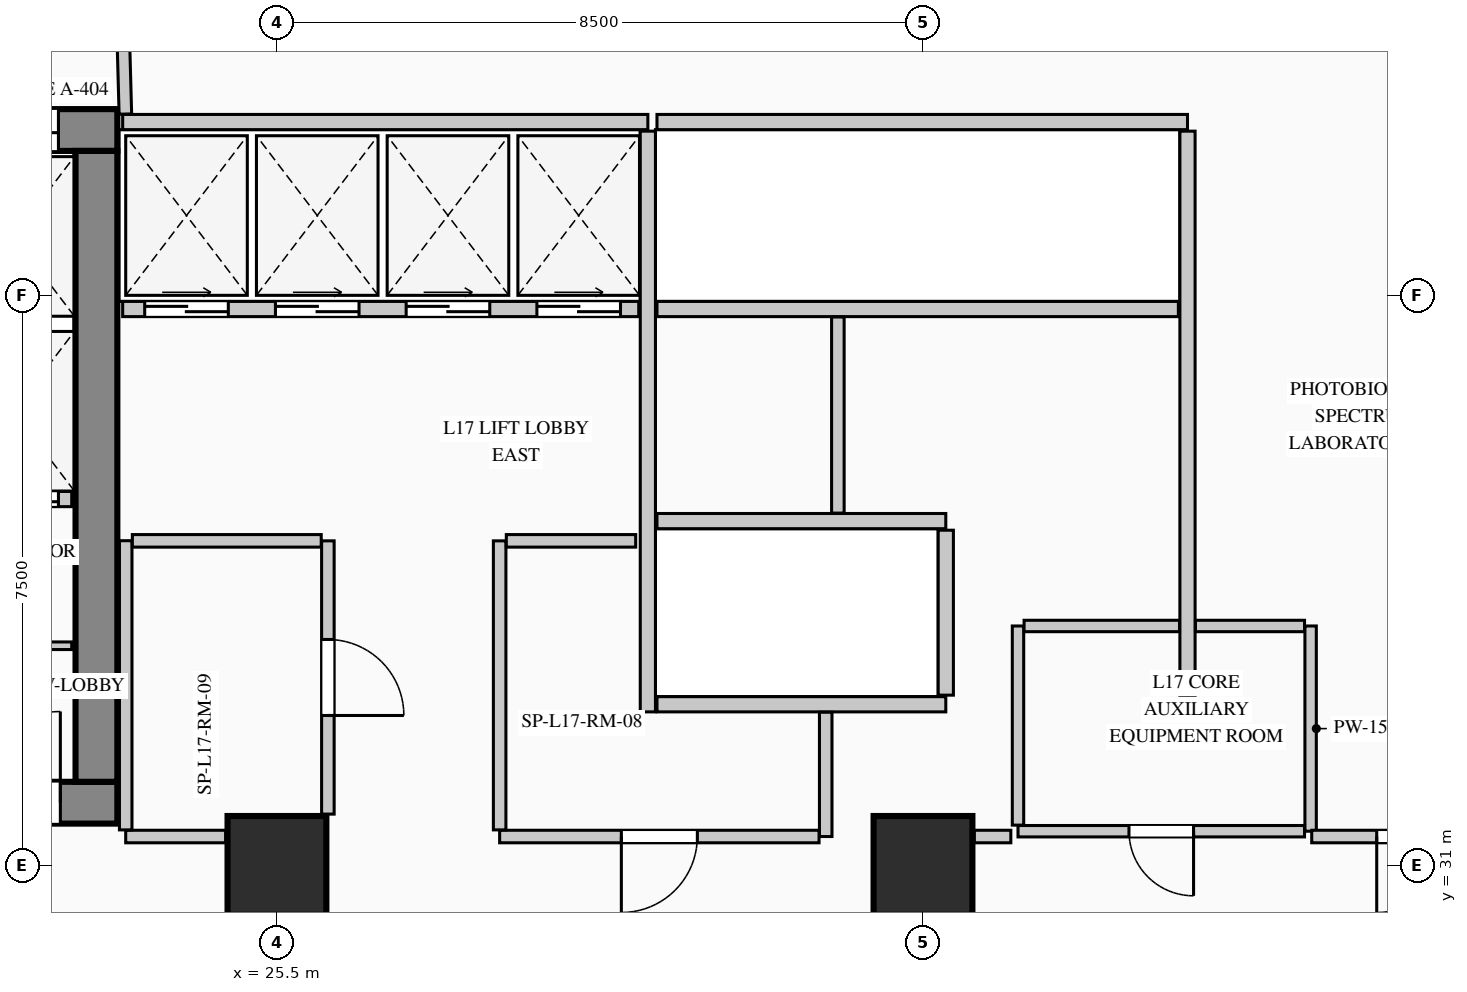
"""IFC4 building model, lengths in metres.
Left out: names, types, materials, properties, quantities, classifications, styles, units other than length and angle.
Written with IfcOpenShell. Run it as: python <this file> out.ifc"""

import sys

from ifc_helpers import new_model, si_unit, direction, frame, frame_2d, origin, origin_2d, place, context, subcontext, project, spatial, rectangle, extrude, element, fill, save


model = new_model("IFC4")
c1 = context("Model", 3, precision=1e-05, world=origin(), true_north=direction((0.0, 1.0)))
c2 = subcontext(c1, "Body", "Model", "MODEL_VIEW")
j1 = project(units=[si_unit("LENGTHUNIT", "METRE"), si_unit("PLANEANGLEUNIT", "RADIAN")], contexts=[c1])
p1 = place(None, origin())
s1 = spatial("IfcSite", under=j1, at=p1, CompositionType="ELEMENT")
p2 = place(p1, origin())
s2 = spatial("IfcBuilding", under=s1, at=p2, CompositionType="ELEMENT")
p3 = place(p2, frame((0.0, 0.0, 75.4)))
s3 = spatial("IfcBuildingStorey", under=s2, at=p3, CompositionType="ELEMENT", Elevation=75.4)
p4 = place(p3, frame((5.45, 40.675, 0.0), z_axis=(0.0, 0.0, 1.0), x_axis=(1.0, 0.0, 0.0)))
e1 = element("IfcWall", 1, at=p4, inside=s3, PredefinedType="SHEAR", context=c2, shape_type="SweptSolid", body=[
    extrude(rectangle(XDim=17.95, YDim=0.55, at=frame_2d((8.975, 0.0))), origin(), (0.0, 0.0, 1.0), 4.4),
])
p5 = place(p4, frame((15.995, 0.0, 0.0)))
e2 = element("IfcOpeningElement", 2, at=p5, cuts=e1, PredefinedType="OPENING", context=c2, shape_type="SweptSolid", body=[
    extrude(rectangle(XDim=1.18, YDim=2.25, at=frame_2d((0.59, 1.125))), frame((0.0, 0.285, 0.0), z_axis=(0.0, -1.0, 0.0), x_axis=(1.0, 0.0, 0.0)), (0.0, 0.0, 1.0), 0.57),
])
p6 = place(p3, frame((5.45, 31.825, 0.0), z_axis=(0.0, 0.0, 1.0), x_axis=(1.0, 0.0, 0.0)))
e3 = element("IfcWall", 3, at=p6, inside=s3, PredefinedType="SHEAR", context=c2, shape_type="SweptSolid", body=[
    extrude(rectangle(XDim=17.95, YDim=0.55, at=frame_2d((8.975, 0.0))), origin(), (0.0, 0.0, 1.0), 4.4),
])
p7 = place(p6, frame((3.2, 0.0, 0.0)))
e4 = element("IfcOpeningElement", 4, at=p7, cuts=e3, PredefinedType="OPENING", context=c2, shape_type="SweptSolid", body=[
    extrude(rectangle(XDim=1.2, YDim=2.2, at=frame_2d((0.6, 1.1))), frame((0.0, 0.285, 0.0), z_axis=(0.0, -1.0, 0.0), x_axis=(1.0, 0.0, 0.0)), (0.0, 0.0, 1.0), 0.57),
])
p8 = place(p6, frame((7.05, 0.0, 0.0)))
e5 = element("IfcOpeningElement", 5, at=p8, cuts=e3, PredefinedType="OPENING", context=c2, shape_type="SweptSolid", body=[
    extrude(rectangle(XDim=1.2, YDim=2.2, at=frame_2d((0.6, 1.1))), frame((0.0, 0.285, 0.0), z_axis=(0.0, -1.0, 0.0), x_axis=(1.0, 0.0, 0.0)), (0.0, 0.0, 1.0), 0.57),
])
p9 = place(p6, frame((8.9, 0.0, 0.0)))
e6 = element("IfcOpeningElement", 6, at=p9, cuts=e3, PredefinedType="OPENING", context=c2, shape_type="SweptSolid", body=[
    extrude(rectangle(XDim=1.15, YDim=2.2, at=frame_2d((0.575, 1.1))), frame((0.0, 0.285, 0.0), z_axis=(0.0, -1.0, 0.0), x_axis=(1.0, 0.0, 0.0)), (0.0, 0.0, 1.0), 0.57),
])
p10 = place(p6, frame((16.0, 0.0, 0.0)))
e7 = element("IfcOpeningElement", 7, at=p10, cuts=e3, PredefinedType="OPENING", context=c2, shape_type="SweptSolid", body=[
    extrude(rectangle(XDim=1.2, YDim=2.2, at=frame_2d((0.6, 1.1))), frame((0.0, 0.285, 0.0), z_axis=(0.0, -1.0, 0.0), x_axis=(1.0, 0.0, 0.0)), (0.0, 0.0, 1.0), 0.57),
])
p11 = place(p3, frame((23.125, 32.1, 0.0), z_axis=(0.0, 0.0, 1.0), x_axis=(0.0, 1.0, 0.0)))
e8 = element("IfcWall", 8, at=p11, inside=s3, PredefinedType="SHEAR", context=c2, shape_type="SweptSolid", body=[
    extrude(rectangle(XDim=8.3, YDim=0.55, at=frame_2d((4.15, 0.0))), origin(), (0.0, 0.0, 1.0), 4.4),
])
for number, where, z_axis, x_axis in (
    (9, (25.5, 31.0, 0.0), (0.0, 0.0, 1.0), (1.0, 0.0, 0.0)),
    (10, (34.0, 31.0, 0.0), (0.0, 0.0, 1.0), (1.0, 0.0, 0.0)),
):
    element("IfcColumn", number, at=place(p3, frame(where, z_axis=z_axis, x_axis=x_axis)), inside=s3, PredefinedType="COLUMN", context=c2, shape_type="SweptSolid", body=[
        extrude(rectangle(XDim=1.3, YDim=1.3, at=origin_2d()), origin(), (0.0, 0.0, 1.0), 4.4),
    ])
p12 = place(p3, frame((21.38, 33.89, 0.0), z_axis=(0.0, 0.0, 1.0), x_axis=(1.0, 0.0, 0.0)))
e11 = element("IfcWall", 11, at=p12, inside=s3, PredefinedType="PARTITIONING", context=c2, shape_type="SweptSolid", body=[
    extrude(rectangle(XDim=1.42, YDim=0.1, at=frame_2d((0.71, 0.0))), origin(), (0.0, 0.0, 1.0), 4.115),
])
p13 = place(p12, frame((0.28, 0.0, 0.0)))
e12 = element("IfcOpeningElement", 12, at=p13, cuts=e11, PredefinedType="OPENING", context=c2, shape_type="SweptSolid", body=[
    extrude(rectangle(XDim=0.85, YDim=2.1, at=frame_2d((0.425, 1.05))), frame((0.0, 0.06, 0.0), z_axis=(0.0, -1.0, 0.0), x_axis=(1.0, 0.0, 0.0)), (0.0, 0.0, 1.0), 0.12),
])
p14 = place(p3, frame((21.3, 35.82, 0.0), z_axis=(0.0, 0.0, 1.0), x_axis=(1.0, 0.0, 0.0)))
e13 = element("IfcWall", 13, at=p14, inside=s3, PredefinedType="PARTITIONING", context=c2, shape_type="SweptSolid", body=[
    extrude(rectangle(XDim=1.5, YDim=0.2, at=frame_2d((0.75, 0.0))), origin(), (0.0, 0.0, 1.0), 4.115),
])
p15 = place(p14, frame((0.145, 0.0, 0.0)))
e14 = element("IfcOpeningElement", 14, at=p15, cuts=e13, PredefinedType="OPENING", context=c2, shape_type="SweptSolid", body=[
    extrude(rectangle(XDim=1.18, YDim=2.25, at=frame_2d((0.59, 1.125))), frame((0.0, 0.11, 0.0), z_axis=(0.0, -1.0, 0.0), x_axis=(1.0, 0.0, 0.0)), (0.0, 0.0, 1.0), 0.22),
])
p16 = place(p3, frame((23.47, 40.78, 0.0), z_axis=(0.0, 0.0, 1.0), x_axis=(1.0, 0.0, 0.0)))
e15 = element("IfcWall", 15, at=p16, inside=s3, PredefinedType="PARTITIONING", context=c2, shape_type="SweptSolid", body=[
    extrude(rectangle(XDim=6.91, YDim=0.2, at=frame_2d((3.455, 0.0))), origin(), (0.0, 0.0, 1.0), 4.115),
])
p17 = place(p3, frame((30.38, 33.02, 0.0), z_axis=(0.0, 0.0, 1.0), x_axis=(0.0, 1.0, 0.0)))
e16 = element("IfcWall", 16, at=p17, inside=s3, PredefinedType="PARTITIONING", context=c2, shape_type="SweptSolid", body=[
    extrude(rectangle(XDim=7.64, YDim=0.2, at=frame_2d((3.82, 0.0))), origin(), (0.0, 0.0, 1.0), 4.115),
])
p18 = place(p3, frame((23.47, 38.32, 0.0), z_axis=(0.0, 0.0, 1.0), x_axis=(1.0, 0.0, 0.0)))
e17 = element("IfcWall", 17, at=p18, inside=s3, PredefinedType="PARTITIONING", context=c2, shape_type="SweptSolid", body=[
    extrude(rectangle(XDim=6.79, YDim=0.2, at=frame_2d((3.395, 0.0))), origin(), (0.0, 0.0, 1.0), 4.115),
])
p19 = place(p18, frame((0.29, 0.0, 0.0)))
e18 = element("IfcOpeningElement", 18, at=p19, cuts=e17, PredefinedType="OPENING", context=c2, shape_type="SweptSolid", body=[
    extrude(rectangle(XDim=1.1, YDim=2.2, at=frame_2d((0.55, 1.1))), frame((0.0, 0.11, 0.0), z_axis=(0.0, -1.0, 0.0), x_axis=(1.0, 0.0, 0.0)), (0.0, 0.0, 1.0), 0.22),
])
p20 = place(p18, frame((2.01, 0.0, 0.0)))
e19 = element("IfcOpeningElement", 19, at=p20, cuts=e17, PredefinedType="OPENING", context=c2, shape_type="SweptSolid", body=[
    extrude(rectangle(XDim=1.1, YDim=2.2, at=frame_2d((0.55, 1.1))), frame((0.0, 0.11, 0.0), z_axis=(0.0, -1.0, 0.0), x_axis=(1.0, 0.0, 0.0)), (0.0, 0.0, 1.0), 0.22),
])
p21 = place(p18, frame((3.73, 0.0, 0.0)))
e20 = element("IfcOpeningElement", 20, at=p21, cuts=e17, PredefinedType="OPENING", context=c2, shape_type="SweptSolid", body=[
    extrude(rectangle(XDim=1.1, YDim=2.2, at=frame_2d((0.55, 1.1))), frame((0.0, 0.11, 0.0), z_axis=(0.0, -1.0, 0.0), x_axis=(1.0, 0.0, 0.0)), (0.0, 0.0, 1.0), 0.22),
])
p22 = place(p18, frame((5.45, 0.0, 0.0)))
e21 = element("IfcOpeningElement", 21, at=p22, cuts=e17, PredefinedType="OPENING", context=c2, shape_type="SweptSolid", body=[
    extrude(rectangle(XDim=1.1, YDim=2.2, at=frame_2d((0.55, 1.1))), frame((0.0, 0.11, 0.0), z_axis=(0.0, -1.0, 0.0), x_axis=(1.0, 0.0, 0.0)), (0.0, 0.0, 1.0), 0.22),
])
p23 = place(p3, frame((30.5, 40.78, 0.0), z_axis=(0.0, 0.0, 1.0), x_axis=(1.0, 0.0, 0.0)))
e22 = element("IfcWall", 22, at=p23, inside=s3, PredefinedType="PARTITIONING", context=c2, shape_type="SweptSolid", body=[
    extrude(rectangle(XDim=6.98, YDim=0.2, at=frame_2d((3.49, 0.0))), origin(), (0.0, 0.0, 1.0), 4.115),
])
p24 = place(p3, frame((37.48, 33.24, 0.0), z_axis=(0.0, 0.0, 1.0), x_axis=(0.0, 1.0, 0.0)))
e23 = element("IfcWall", 23, at=p24, inside=s3, PredefinedType="PARTITIONING", context=c2, shape_type="SweptSolid", body=[
    extrude(rectangle(XDim=7.42, YDim=0.2, at=frame_2d((3.71, 0.0))), origin(), (0.0, 0.0, 1.0), 4.115),
])
p25 = place(p3, frame((30.5, 38.32, 0.0), z_axis=(0.0, 0.0, 1.0), x_axis=(1.0, 0.0, 0.0)))
e24 = element("IfcWall", 24, at=p25, inside=s3, PredefinedType="PARTITIONING", context=c2, shape_type="SweptSolid", body=[
    extrude(rectangle(XDim=6.86, YDim=0.2, at=frame_2d((3.43, 0.0))), origin(), (0.0, 0.0, 1.0), 4.115),
])
for number, where, z_axis, x_axis in (
    (25, (30.5, 35.53, 0.0), (0.0, 0.0, 1.0), (1.0, 0.0, 0.0)),
    (26, (30.5, 33.12, 0.0), (0.0, 0.0, 1.0), (1.0, 0.0, 0.0)),
):
    element("IfcWall", number, at=place(p3, frame(where, z_axis=z_axis, x_axis=x_axis)), inside=s3, PredefinedType="PARTITIONING", context=c2, shape_type="SweptSolid", body=[
        extrude(rectangle(XDim=3.8, YDim=0.2, at=frame_2d((1.9, 0.0))), origin(), (0.0, 0.0, 1.0), 4.115),
    ])
p26 = place(p3, frame((34.3, 33.24, 0.0), z_axis=(0.0, 0.0, 1.0), x_axis=(0.0, 1.0, 0.0)))
e27 = element("IfcWall", 27, at=p26, inside=s3, PredefinedType="PARTITIONING", context=c2, shape_type="SweptSolid", body=[
    extrude(rectangle(XDim=2.17, YDim=0.2, at=frame_2d((1.085, 0.0))), origin(), (0.0, 0.0, 1.0), 4.115),
])
p27 = place(p3, frame((39.1, 34.15, 0.0), z_axis=(0.0, 0.0, 1.0), x_axis=(0.0, -1.0, 0.0)))
e28 = element("IfcWall", 28, at=p27, inside=s3, PredefinedType="PARTITIONING", context=c2, shape_type="SweptSolid", body=[
    extrude(rectangle(XDim=2.7, YDim=0.15, at=frame_2d((1.35, 0.0))), origin(), (0.0, 0.0, 1.0), 4.115),
])
p28 = place(p3, frame((39.02, 31.45, 0.0), z_axis=(0.0, 0.0, 1.0), x_axis=(-1.0, 0.0, 0.0)))
e29 = element("IfcWall", 29, at=p28, inside=s3, PredefinedType="PARTITIONING", context=c2, shape_type="SweptSolid", body=[
    extrude(rectangle(XDim=3.77, YDim=0.15, at=frame_2d((1.885, 0.0))), origin(), (0.0, 0.0, 1.0), 4.115),
])
p29 = place(p28, frame((1.46, 0.0, 0.0)))
e30 = element("IfcOpeningElement", 30, at=p29, cuts=e29, PredefinedType="OPENING", context=c2, shape_type="SweptSolid", body=[
    extrude(rectangle(XDim=0.85, YDim=2.1, at=frame_2d((0.425, 1.05))), frame((0.0, 0.085, 0.0), z_axis=(0.0, -1.0, 0.0), x_axis=(1.0, 0.0, 0.0)), (0.0, 0.0, 1.0), 0.17),
])
p30 = place(p3, frame((35.25, 31.53, 0.0), z_axis=(0.0, 0.0, 1.0), x_axis=(0.0, 1.0, 0.0)))
e31 = element("IfcWall", 31, at=p30, inside=s3, PredefinedType="PARTITIONING", context=c2, shape_type="SweptSolid", body=[
    extrude(rectangle(XDim=2.62, YDim=0.15, at=frame_2d((1.31, 0.0))), origin(), (0.0, 0.0, 1.0), 4.115),
])
p31 = place(p3, frame((37.585, 34.15, 0.0), z_axis=(0.0, 0.0, 1.0), x_axis=(1.0, 0.0, 0.0)))
e32 = element("IfcWall", 32, at=p31, inside=s3, PredefinedType="PARTITIONING", context=c2, shape_type="SweptSolid", body=[
    extrude(rectangle(XDim=1.435, YDim=0.15, at=frame_2d((0.718, 0.0))), origin(), (0.0, 0.0, 1.0), 4.115),
])
p32 = place(p3, frame((35.33, 34.15, 0.0), z_axis=(0.0, 0.0, 1.0), x_axis=(1.0, 0.0, 0.0)))
e33 = element("IfcWall", 33, at=p32, inside=s3, PredefinedType="PARTITIONING", context=c2, shape_type="SweptSolid", body=[
    extrude(rectangle(XDim=2.045, YDim=0.15, at=frame_2d((1.022, 0.0))), origin(), (0.0, 0.0, 1.0), 4.115),
])
p33 = place(p3, frame((32.72, 33.015, 0.0), z_axis=(0.0, 0.0, 1.0), x_axis=(0.0, -1.0, 0.0)))
e34 = element("IfcWall", 34, at=p33, inside=s3, PredefinedType="PARTITIONING", context=c2, shape_type="SweptSolid", body=[
    extrude(rectangle(XDim=1.635, YDim=0.165, at=frame_2d((0.817, 0.0))), origin(), (0.0, 0.0, 1.0), 4.115),
])
p34 = place(p3, frame((32.633, 31.38, 0.0), z_axis=(0.0, 0.0, 1.0), x_axis=(-1.0, 0.0, 0.0)))
e35 = element("IfcWall", 35, at=p34, inside=s3, PredefinedType="PARTITIONING", context=c2, shape_type="SweptSolid", body=[
    extrude(rectangle(XDim=4.203, YDim=0.165, at=frame_2d((2.101, 0.0))), origin(), (0.0, 0.0, 1.0), 4.115),
])
p35 = place(p34, frame((1.601, 0.0, 0.0)))
e36 = element("IfcOpeningElement", 36, at=p35, cuts=e35, PredefinedType="OPENING", context=c2, shape_type="SweptSolid", body=[
    extrude(rectangle(XDim=1.0, YDim=2.15, at=frame_2d((0.5, 1.075))), frame((0.0, 0.093, 0.0), z_axis=(0.0, -1.0, 0.0), x_axis=(1.0, 0.0, 0.0)), (0.0, 0.0, 1.0), 0.185),
])
p36 = place(p3, frame((28.43, 31.468, 0.0), z_axis=(0.0, 0.0, 1.0), x_axis=(0.0, 1.0, 0.0)))
e37 = element("IfcWall", 37, at=p36, inside=s3, PredefinedType="PARTITIONING", context=c2, shape_type="SweptSolid", body=[
    extrude(rectangle(XDim=3.802, YDim=0.165, at=frame_2d((1.901, 0.0))), origin(), (0.0, 0.0, 1.0), 4.115),
])
p37 = place(p3, frame((28.518, 35.27, 0.0), z_axis=(0.0, 0.0, 1.0), x_axis=(1.0, 0.0, 0.0)))
e38 = element("IfcWall", 38, at=p37, inside=s3, PredefinedType="PARTITIONING", context=c2, shape_type="SweptSolid", body=[
    extrude(rectangle(XDim=1.702, YDim=0.165, at=frame_2d((0.851, 0.0))), origin(), (0.0, 0.0, 1.0), 4.115),
])
p38 = place(p3, frame((26.17, 35.27, 0.0), z_axis=(0.0, 0.0, 1.0), x_axis=(0.0, -1.0, 0.0)))
e39 = element("IfcWall", 39, at=p38, inside=s3, PredefinedType="PARTITIONING", context=c2, shape_type="SweptSolid", body=[
    extrude(rectangle(XDim=3.595, YDim=0.165, at=frame_2d((1.797, 0.0))), origin(), (0.0, 0.0, 1.0), 4.115),
])
p39 = place(p38, frame((1.298, 0.0, 0.0)))
e40 = element("IfcOpeningElement", 40, at=p39, cuts=e39, PredefinedType="OPENING", context=c2, shape_type="SweptSolid", body=[
    extrude(rectangle(XDim=1.0, YDim=2.15, at=frame_2d((0.5, 1.075))), frame((0.0, 0.093, 0.0), z_axis=(0.0, -1.0, 0.0), x_axis=(1.0, 0.0, 0.0)), (0.0, 0.0, 1.0), 0.185),
])
p40 = place(p3, frame((24.825, 31.38, 0.0), z_axis=(0.0, 0.0, 1.0), x_axis=(-1.0, 0.0, 0.0)))
e41 = element("IfcWall", 41, at=p40, inside=s3, PredefinedType="PARTITIONING", context=c2, shape_type="SweptSolid", body=[
    extrude(rectangle(XDim=1.315, YDim=0.165, at=frame_2d((0.657, 0.0))), origin(), (0.0, 0.0, 1.0), 4.115),
])
p41 = place(p3, frame((23.51, 31.468, 0.0), z_axis=(0.0, 0.0, 1.0), x_axis=(0.0, 1.0, 0.0)))
e42 = element("IfcWall", 42, at=p41, inside=s3, PredefinedType="PARTITIONING", context=c2, shape_type="SweptSolid", body=[
    extrude(rectangle(XDim=3.804, YDim=0.165, at=frame_2d((1.902, 0.0))), origin(), (0.0, 0.0, 1.0), 4.115),
])
p42 = place(p3, frame((23.597, 35.27, 0.0), z_axis=(0.0, 0.0, 1.0), x_axis=(1.0, 0.0, 0.0)))
e43 = element("IfcWall", 43, at=p42, inside=s3, PredefinedType="PARTITIONING", context=c2, shape_type="SweptSolid", body=[
    extrude(rectangle(XDim=2.485, YDim=0.165, at=frame_2d((1.243, 0.0))), origin(), (0.0, 0.0, 1.0), 4.115),
])
p43 = place(p3, frame((41.825, 31.38, 0.0), z_axis=(0.0, 0.0, 1.0), x_axis=(-1.0, 0.0, 0.0)))
e44 = element("IfcWall", 44, at=p43, inside=s3, PredefinedType="PARTITIONING", context=c2, shape_type="SweptSolid", body=[
    extrude(rectangle(XDim=2.71, YDim=0.165, at=frame_2d((1.355, 0.0))), origin(), (0.0, 0.0, 1.0), 4.115),
])
p44 = place(p43, frame((0.855, 0.0, 0.0)))
e45 = element("IfcOpeningElement", 45, at=p44, cuts=e44, PredefinedType="OPENING", context=c2, shape_type="SweptSolid", body=[
    extrude(rectangle(XDim=1.0, YDim=2.15, at=frame_2d((0.5, 1.075))), frame((0.0, 0.093, 0.0), z_axis=(0.0, -1.0, 0.0), x_axis=(1.0, 0.0, 0.0)), (0.0, 0.0, 1.0), 0.185),
])
p45 = place(p3, frame((35.156, 31.38, 0.0), z_axis=(0.0, 0.0, 1.0), x_axis=(-1.0, 0.0, 0.0)))
e46 = element("IfcWall", 46, at=p45, inside=s3, PredefinedType="PARTITIONING", context=c2, shape_type="SweptSolid", body=[
    extrude(rectangle(XDim=0.48, YDim=0.165, at=frame_2d((0.24, 0.0))), origin(), (0.0, 0.0, 1.0), 4.115),
])
p46 = place(p3, frame((32.88, 35.635, 0.0), z_axis=(0.0, 0.0, 1.0), x_axis=(0.0, 1.0, 0.0)))
e47 = element("IfcWall", 47, at=p46, inside=s3, PredefinedType="PARTITIONING", context=c2, shape_type="SweptSolid", body=[
    extrude(rectangle(XDim=2.58, YDim=0.165, at=frame_2d((1.29, 0.0))), origin(), (0.0, 0.0, 1.0), 4.115),
])
p47 = place(p3, frame((23.506, 40.885, 0.0), z_axis=(0.0, 0.0, 1.0), x_axis=(-0.027441464163, 0.999623412113, 0.0)))
e48 = element("IfcWall", 48, at=p47, inside=s3, PredefinedType="PARTITIONING", context=c2, shape_type="SweptSolid", body=[
    extrude(rectangle(XDim=2.331, YDim=0.165, at=frame_2d((1.166, 0.0))), origin(), (0.0, 0.0, 1.0), 4.115),
])
p48 = place(p10, origin())
e49 = element("IfcDoor", 49, at=p48, inside=s3, OperationType="SINGLE_SWING_RIGHT", PredefinedType="DOOR", context=c2, shape_type="SweptSolid", body=[
    extrude(rectangle(XDim=1.2, YDim=2.2, at=frame_2d((0.6, 1.1))), frame((0.0, 0.025, 0.0), z_axis=(0.0, -1.0, 0.0), x_axis=(1.0, 0.0, 0.0)), (0.0, 0.0, 1.0), 0.05),
])
fill(e7, e49)
p49 = place(p5, origin())
e50 = element("IfcDoor", 50, at=p49, inside=s3, OperationType="DOUBLE_DOOR_SLIDING", PredefinedType="DOOR", context=c2, shape_type="SweptSolid", body=[
    extrude(rectangle(XDim=1.18, YDim=2.25, at=frame_2d((0.59, 1.125))), frame((0.0, 0.025, 0.0), z_axis=(0.0, -1.0, 0.0), x_axis=(1.0, 0.0, 0.0)), (0.0, 0.0, 1.0), 0.05),
])
fill(e2, e50)
p50 = place(p15, origin())
e51 = element("IfcDoor", 51, at=p50, inside=s3, OperationType="DOUBLE_DOOR_SLIDING", PredefinedType="DOOR", context=c2, shape_type="SweptSolid", body=[
    extrude(rectangle(XDim=1.18, YDim=2.25, at=frame_2d((0.59, 1.125))), frame((0.0, 0.025, 0.0), z_axis=(0.0, -1.0, 0.0), x_axis=(1.0, 0.0, 0.0)), (0.0, 0.0, 1.0), 0.05),
])
fill(e14, e51)
p51 = place(p19, origin())
e52 = element("IfcDoor", 52, at=p51, inside=s3, OperationType="DOUBLE_DOOR_SLIDING", PredefinedType="DOOR", context=c2, shape_type="SweptSolid", body=[
    extrude(rectangle(XDim=1.1, YDim=2.2, at=frame_2d((0.55, 1.1))), frame((0.0, 0.025, 0.0), z_axis=(0.0, -1.0, 0.0), x_axis=(1.0, 0.0, 0.0)), (0.0, 0.0, 1.0), 0.05),
])
fill(e18, e52)
p52 = place(p20, origin())
e53 = element("IfcDoor", 53, at=p52, inside=s3, OperationType="DOUBLE_DOOR_SLIDING", PredefinedType="DOOR", context=c2, shape_type="SweptSolid", body=[
    extrude(rectangle(XDim=1.1, YDim=2.2, at=frame_2d((0.55, 1.1))), frame((0.0, 0.025, 0.0), z_axis=(0.0, -1.0, 0.0), x_axis=(1.0, 0.0, 0.0)), (0.0, 0.0, 1.0), 0.05),
])
fill(e19, e53)
p53 = place(p21, origin())
e54 = element("IfcDoor", 54, at=p53, inside=s3, OperationType="DOUBLE_DOOR_SLIDING", PredefinedType="DOOR", context=c2, shape_type="SweptSolid", body=[
    extrude(rectangle(XDim=1.1, YDim=2.2, at=frame_2d((0.55, 1.1))), frame((0.0, 0.025, 0.0), z_axis=(0.0, -1.0, 0.0), x_axis=(1.0, 0.0, 0.0)), (0.0, 0.0, 1.0), 0.05),
])
fill(e20, e54)
p54 = place(p22, origin())
e55 = element("IfcDoor", 55, at=p54, inside=s3, OperationType="DOUBLE_DOOR_SLIDING", PredefinedType="DOOR", context=c2, shape_type="SweptSolid", body=[
    extrude(rectangle(XDim=1.1, YDim=2.2, at=frame_2d((0.55, 1.1))), frame((0.0, 0.025, 0.0), z_axis=(0.0, -1.0, 0.0), x_axis=(1.0, 0.0, 0.0)), (0.0, 0.0, 1.0), 0.05),
])
fill(e21, e55)
p55 = place(p29, origin())
e56 = element("IfcDoor", 56, at=p55, inside=s3, OperationType="SINGLE_SWING_LEFT", PredefinedType="DOOR", context=c2, shape_type="SweptSolid", body=[
    extrude(rectangle(XDim=0.85, YDim=2.1, at=frame_2d((0.425, 1.05))), frame((0.0, 0.025, 0.0), z_axis=(0.0, -1.0, 0.0), x_axis=(1.0, 0.0, 0.0)), (0.0, 0.0, 1.0), 0.05),
])
fill(e30, e56)
p56 = place(p35, origin())
e57 = element("IfcDoor", 57, at=p56, inside=s3, OperationType="SINGLE_SWING_RIGHT", PredefinedType="DOOR", context=c2, shape_type="SweptSolid", body=[
    extrude(rectangle(XDim=1.0, YDim=2.15, at=frame_2d((0.5, 1.075))), frame((0.0, 0.025, 0.0), z_axis=(0.0, -1.0, 0.0), x_axis=(1.0, 0.0, 0.0)), (0.0, 0.0, 1.0), 0.05),
])
fill(e36, e57)
p57 = place(p39, origin())
e58 = element("IfcDoor", 58, at=p57, inside=s3, OperationType="SINGLE_SWING_RIGHT", PredefinedType="DOOR", context=c2, shape_type="SweptSolid", body=[
    extrude(rectangle(XDim=1.0, YDim=2.15, at=frame_2d((0.5, 1.075))), frame((0.0, 0.025, 0.0), z_axis=(0.0, -1.0, 0.0), x_axis=(1.0, 0.0, 0.0)), (0.0, 0.0, 1.0), 0.05),
])
fill(e40, e58)
p58 = place(p44, origin())
e59 = element("IfcDoor", 59, at=p58, inside=s3, OperationType="SINGLE_SWING_RIGHT", PredefinedType="DOOR", context=c2, shape_type="SweptSolid", body=[
    extrude(rectangle(XDim=1.0, YDim=2.15, at=frame_2d((0.5, 1.075))), frame((0.0, 0.025, 0.0), z_axis=(0.0, -1.0, 0.0), x_axis=(1.0, 0.0, 0.0)), (0.0, 0.0, 1.0), 0.05),
])
fill(e45, e59)
save(model, sys.argv[1])
